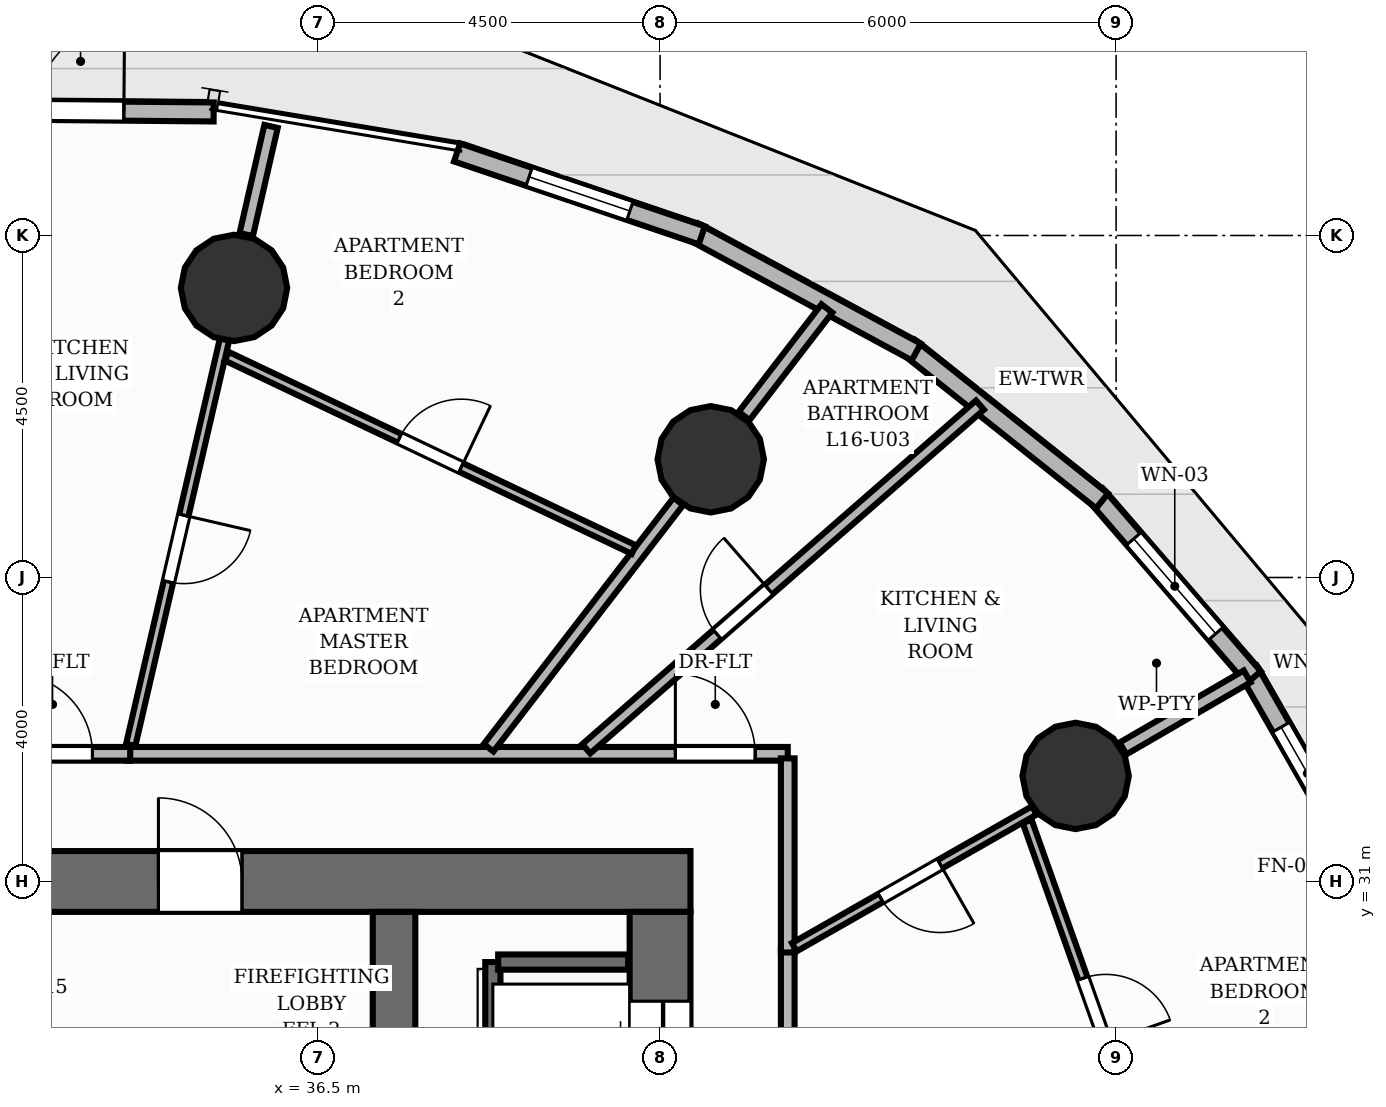
"""IFC4 building model, lengths in metres.
Left out: names, types, materials, properties, quantities, classifications, styles, units other than length and angle.
Written with IfcOpenShell. Run it as: python <this file> out.ifc"""

import sys

from ifc_helpers import new_model, si_unit, direction, frame, frame_2d, origin, origin_2d, place, context, subcontext, project, spatial, rectangle, circle, extrude, element, fill, save


model = new_model("IFC4")
c1 = context("Model", 3, precision=1e-05, world=origin(), true_north=direction((0.0, 1.0)))
c2 = subcontext(c1, "Body", "Model", "MODEL_VIEW")
j1 = project(units=[si_unit("LENGTHUNIT", "METRE"), si_unit("PLANEANGLEUNIT", "RADIAN")], contexts=[c1])
p1 = place(None, origin())
s1 = spatial("IfcSite", under=j1, at=p1, CompositionType="ELEMENT")
p2 = place(p1, origin())
s2 = spatial("IfcBuilding", under=s1, at=p2, CompositionType="ELEMENT")
p3 = place(p2, frame((0.0, 0.0, 56.8)))
s3 = spatial("IfcBuildingStorey", under=s2, at=p3, CompositionType="ELEMENT", Elevation=56.8)
p4 = place(p3, frame((22.6, 31.0, 0.0), z_axis=(0.0, 0.0, 1.0), x_axis=(1.0, 0.0, 0.0)))
e1 = element("IfcWall", 1, at=p4, inside=s3, PredefinedType="SHEAR", context=c2, shape_type="SweptSolid", body=[
    extrude(rectangle(XDim=18.8, YDim=0.8, at=frame_2d((9.4, 0.0))), origin(), (0.0, 0.0, 1.0), 3.2),
])
p5 = place(p4, frame((11.8, 0.0, 0.0)))
e2 = element("IfcOpeningElement", 2, at=p5, cuts=e1, PredefinedType="OPENING", context=c2, shape_type="SweptSolid", body=[
    extrude(rectangle(XDim=1.1, YDim=2.15, at=frame_2d((0.55, 1.075))), frame((0.0, 0.41, 0.0), z_axis=(0.0, -1.0, 0.0), x_axis=(1.0, 0.0, 0.0)), (0.0, 0.0, 1.0), 0.82),
])
p6 = place(p3, frame((41.0, 17.4, 0.0), z_axis=(0.0, 0.0, 1.0), x_axis=(0.0, 1.0, 0.0)))
e3 = element("IfcWall", 3, at=p6, inside=s3, PredefinedType="SHEAR", context=c2, shape_type="SweptSolid", body=[
    extrude(rectangle(XDim=13.2, YDim=0.8, at=frame_2d((6.6, 0.0))), origin(), (0.0, 0.0, 1.0), 3.2),
])
p7 = place(p6, frame((1.175, 0.0, 0.0)))
e4 = element("IfcOpeningElement", 4, at=p7, cuts=e3, PredefinedType="OPENING", context=c2, shape_type="SweptSolid", body=[
    extrude(rectangle(XDim=1.05, YDim=2.15, at=frame_2d((0.525, 1.075))), frame((0.0, 0.41, 0.0), z_axis=(0.0, -1.0, 0.0), x_axis=(1.0, 0.0, 0.0)), (0.0, 0.0, 1.0), 0.82),
])
p8 = place(p6, frame((4.425, 0.0, 0.0)))
e5 = element("IfcOpeningElement", 5, at=p8, cuts=e3, PredefinedType="OPENING", context=c2, shape_type="SweptSolid", body=[
    extrude(rectangle(XDim=1.05, YDim=2.15, at=frame_2d((0.525, 1.075))), frame((0.0, 0.41, 0.0), z_axis=(0.0, -1.0, 0.0), x_axis=(1.0, 0.0, 0.0)), (0.0, 0.0, 1.0), 0.82),
])
p9 = place(p6, frame((7.725, 0.0, 0.0)))
e6 = element("IfcOpeningElement", 6, at=p9, cuts=e3, PredefinedType="OPENING", context=c2, shape_type="SweptSolid", body=[
    extrude(rectangle(XDim=1.05, YDim=2.15, at=frame_2d((0.525, 1.075))), frame((0.0, 0.41, 0.0), z_axis=(0.0, -1.0, 0.0), x_axis=(1.0, 0.0, 0.0)), (0.0, 0.0, 1.0), 0.82),
])
p10 = place(p6, frame((10.975, 0.0, 0.0)))
e7 = element("IfcOpeningElement", 7, at=p10, cuts=e3, PredefinedType="OPENING", context=c2, shape_type="SweptSolid", body=[
    extrude(rectangle(XDim=1.05, YDim=2.15, at=frame_2d((0.525, 1.075))), frame((0.0, 0.41, 0.0), z_axis=(0.0, -1.0, 0.0), x_axis=(1.0, 0.0, 0.0)), (0.0, 0.0, 1.0), 0.82),
])
p11 = place(p3, frame((37.5, 17.4, 0.0), z_axis=(0.0, 0.0, 1.0), x_axis=(0.0, 1.0, 0.0)))
e8 = element("IfcWall", 8, at=p11, inside=s3, PredefinedType="SHEAR", context=c2, shape_type="SweptSolid", body=[
    extrude(rectangle(XDim=13.2, YDim=0.56, at=frame_2d((6.6, 0.0))), origin(), (0.0, 0.0, 1.0), 3.2),
])
for number, where, z_axis, x_axis in (
    (9, (46.468, 32.389, 0.0), (0.0, 0.0, 1.0), (1.0, 0.0, 0.0)),
    (10, (41.667, 36.555, 0.0), (0.0, 0.0, 1.0), (1.0, 0.0, 0.0)),
    (11, (35.395, 38.81, 0.0), (0.0, 0.0, 1.0), (1.0, 0.0, 0.0)),
):
    element("IfcColumn", number, at=place(p3, frame(where, z_axis=z_axis, x_axis=x_axis)), inside=s3, PredefinedType="COLUMN", context=c2, shape_type="SweptSolid", body=[
        extrude(circle(Radius=0.7, at=origin_2d()), origin(), (0.0, 0.0, 1.0), 3.2),
    ])
p12 = place(p3, frame((48.744, 33.777, 0.0), z_axis=(0.0, 0.0, 1.0), x_axis=(0.496155788519, -0.868233513243, 0.0)))
e12 = element("IfcWall", 12, at=p12, inside=s3, PredefinedType="SOLIDWALL", context=c2, shape_type="SweptSolid", body=[
    extrude(rectangle(XDim=3.121, YDim=0.25, at=frame_2d((1.56, 0.0))), origin(), (0.0, 0.0, 1.0), 2.96),
])
p13 = place(p12, frame((0.86, 0.0, 0.85)))
e13 = element("IfcOpeningElement", 13, at=p13, cuts=e12, PredefinedType="OPENING", context=c2, shape_type="SweptSolid", body=[
    extrude(rectangle(XDim=1.4, YDim=1.55, at=frame_2d((0.7, 0.775))), frame((0.0, 0.135, 0.0), z_axis=(0.0, -1.0, 0.0), x_axis=(1.0, 0.0, 0.0)), (0.0, 0.0, 1.0), 0.27),
])
p14 = place(p3, frame((46.734, 36.086, 0.0), z_axis=(0.0, 0.0, 1.0), x_axis=(0.653770062489, -0.75669327035, 0.0)))
e14 = element("IfcWall", 14, at=p14, inside=s3, PredefinedType="SOLIDWALL", context=c2, shape_type="SweptSolid", body=[
    extrude(rectangle(XDim=3.174, YDim=0.25, at=frame_2d((1.587, 0.0))), origin(), (0.0, 0.0, 1.0), 2.96),
])
p15 = place(p14, frame((0.762, 0.0, 0.85)))
e15 = element("IfcOpeningElement", 15, at=p15, cuts=e14, PredefinedType="OPENING", context=c2, shape_type="SweptSolid", body=[
    extrude(rectangle(XDim=1.65, YDim=1.55, at=frame_2d((0.825, 0.775))), frame((0.0, 0.135, 0.0), z_axis=(0.0, -1.0, 0.0), x_axis=(1.0, 0.0, 0.0)), (0.0, 0.0, 1.0), 0.27),
])
p16 = place(p3, frame((44.278, 38.029, 0.0), z_axis=(0.0, 0.0, 1.0), x_axis=(0.78232767864, -0.622867083119, 0.0)))
e16 = element("IfcWall", 16, at=p16, inside=s3, PredefinedType="SOLIDWALL", context=c2, shape_type="SweptSolid", body=[
    extrude(rectangle(XDim=3.244, YDim=0.25, at=frame_2d((1.622, 0.0))), origin(), (0.0, 0.0, 1.0), 2.96),
])
p17 = place(p3, frame((41.448, 39.546, 0.0), z_axis=(0.0, 0.0, 1.0), x_axis=(0.879811992908, -0.475321845843, 0.0)))
e17 = element("IfcWall", 17, at=p17, inside=s3, PredefinedType="SOLIDWALL", context=c2, shape_type="SweptSolid", body=[
    extrude(rectangle(XDim=3.323, YDim=0.25, at=frame_2d((1.661, 0.0))), origin(), (0.0, 0.0, 1.0), 2.96),
])
p18 = place(p3, frame((38.33, 40.593, 0.0), z_axis=(0.0, 0.0, 1.0), x_axis=(0.947149503871, -0.320792483262, 0.0)))
e18 = element("IfcWall", 18, at=p18, inside=s3, PredefinedType="SOLIDWALL", context=c2, shape_type="SweptSolid", body=[
    extrude(rectangle(XDim=3.399, YDim=0.25, at=frame_2d((1.699, 0.0))), origin(), (0.0, 0.0, 1.0), 2.96),
])
p19 = place(p18, frame((1.0, 0.0, 0.85)))
e19 = element("IfcOpeningElement", 19, at=p19, cuts=e18, PredefinedType="OPENING", context=c2, shape_type="SweptSolid", body=[
    extrude(rectangle(XDim=1.4, YDim=1.55, at=frame_2d((0.7, 0.775))), frame((0.0, 0.135, 0.0), z_axis=(0.0, -1.0, 0.0), x_axis=(1.0, 0.0, 0.0)), (0.0, 0.0, 1.0), 0.27),
])
p20 = place(p3, frame((31.614, 41.156, 0.0), z_axis=(0.0, 0.0, 1.0), x_axis=(0.999961046076, -0.008826456273, 0.0)))
e20 = element("IfcWall", 20, at=p20, inside=s3, PredefinedType="SOLIDWALL", context=c2, shape_type="SweptSolid", body=[
    extrude(rectangle(XDim=3.513, YDim=0.25, at=frame_2d((1.756, 0.0))), origin(), (0.0, 0.0, 1.0), 2.96),
])
p21 = place(p20, frame((1.181, 0.0, 0.0)))
e21 = element("IfcOpeningElement", 21, at=p21, cuts=e20, PredefinedType="OPENING", context=c2, shape_type="SweptSolid", body=[
    extrude(rectangle(XDim=1.15, YDim=2.2, at=frame_2d((0.575, 1.1))), frame((0.0, 0.135, 0.0), z_axis=(0.0, -1.0, 0.0), x_axis=(1.0, 0.0, 0.0)), (0.0, 0.0, 1.0), 0.27),
])
p22 = place(p3, frame((38.8, 18.06, 0.0), z_axis=(0.0, 0.0, 1.0), x_axis=(0.0, 1.0, 0.0)))
e22 = element("IfcWall", 22, at=p22, inside=s3, PredefinedType="SHEAR", context=c2, shape_type="SweptSolid", body=[
    extrude(rectangle(XDim=11.88, YDim=0.2, at=frame_2d((5.94, 0.0))), origin(), (0.0, 0.0, 1.0), 3.2),
])
p23 = place(p3, frame((38.87, 29.94, 0.0), z_axis=(0.0, 0.0, 1.0), x_axis=(1.0, 0.0, 0.0)))
e23 = element("IfcWall", 23, at=p23, inside=s3, PredefinedType="SHEAR", context=c2, shape_type="SweptSolid", body=[
    extrude(rectangle(XDim=1.71, YDim=0.2, at=frame_2d((0.855, 0.0))), origin(), (0.0, 0.0, 1.0), 3.2),
])
p24 = place(p3, frame((47.091, 32.75, 0.0), z_axis=(0.0, 0.0, 1.0), x_axis=(0.865027823723, 0.501723892379, 0.0)))
e24 = element("IfcWall", 24, at=p24, inside=s3, PredefinedType="PARTITIONING", context=c2, shape_type="SweptSolid", body=[
    extrude(rectangle(XDim=1.889, YDim=0.18, at=frame_2d((0.944, 0.0))), origin(), (0.0, 0.0, 1.0), 2.178),
])
p25 = place(p3, frame((42.106, 37.126, 0.0), z_axis=(0.0, 0.0, 1.0), x_axis=(0.61002145357, 0.792384897752, 0.0)))
e25 = element("IfcWall", 25, at=p25, inside=s3, PredefinedType="PARTITIONING", context=c2, shape_type="SweptSolid", body=[
    extrude(rectangle(XDim=1.785, YDim=0.18, at=frame_2d((0.892, 0.0))), origin(), (0.0, 0.0, 1.0), 2.178),
])
p26 = place(p3, frame((35.555, 39.512, 0.0), z_axis=(0.0, 0.0, 1.0), x_axis=(0.223491959946, 0.974705772959, 0.0)))
e26 = element("IfcWall", 26, at=p26, inside=s3, PredefinedType="PARTITIONING", context=c2, shape_type="SweptSolid", body=[
    extrude(rectangle(XDim=1.46, YDim=0.18, at=frame_2d((0.73, 0.0))), origin(), (0.0, 0.0, 1.0), 2.178),
])
p27 = place(p3, frame((42.68, 30.109, 0.0), z_axis=(0.0, 0.0, 1.0), x_axis=(0.0, -1.0, 0.0)))
e27 = element("IfcWall", 27, at=p27, inside=s3, PredefinedType="PARTITIONING", context=c2, shape_type="SweptSolid", body=[
    extrude(rectangle(XDim=14.789, YDim=0.18, at=frame_2d((7.395, 0.0))), origin(), (0.0, 0.0, 1.0), 2.955),
])
p28 = place(p27, frame((9.4, 0.0, 0.0)))
e28 = element("IfcOpeningElement", 28, at=p28, cuts=e27, PredefinedType="OPENING", context=c2, shape_type="SweptSolid", body=[
    extrude(rectangle(XDim=1.05, YDim=2.15, at=frame_2d((0.525, 1.075))), frame((0.0, 0.1, 0.0), z_axis=(0.0, -1.0, 0.0), x_axis=(1.0, 0.0, 0.0)), (0.0, 0.0, 1.0), 0.2),
])
p29 = place(p3, frame((33.988, 32.68, 0.0), z_axis=(0.0, 0.0, 1.0), x_axis=(1.0, 0.0, 0.0)))
e29 = element("IfcWall", 29, at=p29, inside=s3, PredefinedType="PARTITIONING", context=c2, shape_type="SweptSolid", body=[
    extrude(rectangle(XDim=8.692, YDim=0.18, at=frame_2d((4.346, 0.0))), origin(), (0.0, 0.0, 1.0), 2.955),
])
p30 = place(p29, frame((7.213, 0.0, 0.0)))
e30 = element("IfcOpeningElement", 30, at=p30, cuts=e29, PredefinedType="OPENING", context=c2, shape_type="SweptSolid", body=[
    extrude(rectangle(XDim=1.05, YDim=2.15, at=frame_2d((0.525, 1.075))), frame((0.0, 0.1, 0.0), z_axis=(0.0, -1.0, 0.0), x_axis=(1.0, 0.0, 0.0)), (0.0, 0.0, 1.0), 0.2),
])
p31 = place(p3, frame((42.68, 32.62, 0.0), z_axis=(0.0, 0.0, 1.0), x_axis=(0.0, -1.0, 0.0)))
e31 = element("IfcWall", 31, at=p31, inside=s3, PredefinedType="PARTITIONING", context=c2, shape_type="SweptSolid", body=[
    extrude(rectangle(XDim=2.554, YDim=0.18, at=frame_2d((1.277, 0.0))), origin(), (0.0, 0.0, 1.0), 2.955),
])
p32 = place(p3, frame((22.26, 32.68, 0.0), z_axis=(0.0, 0.0, 1.0), x_axis=(1.0, 0.0, 0.0)))
e32 = element("IfcWall", 32, at=p32, inside=s3, PredefinedType="PARTITIONING", context=c2, shape_type="SweptSolid", body=[
    extrude(rectangle(XDim=11.769, YDim=0.18, at=frame_2d((5.885, 0.0))), origin(), (0.0, 0.0, 1.0), 2.955),
])
p33 = place(p32, frame((10.222, 0.0, 0.0)))
e33 = element("IfcOpeningElement", 33, at=p33, cuts=e32, PredefinedType="OPENING", context=c2, shape_type="SweptSolid", body=[
    extrude(rectangle(XDim=1.05, YDim=2.15, at=frame_2d((0.525, 1.075))), frame((0.0, 0.1, 0.0), z_axis=(0.0, -1.0, 0.0), x_axis=(1.0, 0.0, 0.0)), (0.0, 0.0, 1.0), 0.2),
])
p34 = place(p3, frame((40.028, 32.746, 0.0), z_axis=(0.0, 0.0, 1.0), x_axis=(0.753328390337, 0.657644536442, 0.0)))
e34 = element("IfcWall", 34, at=p34, inside=s3, PredefinedType="PLUMBINGWALL", context=c2, shape_type="SweptSolid", body=[
    extrude(rectangle(XDim=6.876, YDim=0.16, at=frame_2d((3.438, 0.0))), origin(), (0.0, 0.0, 1.0), 2.955),
])
p35 = place(p34, frame((2.288, 0.0, 0.0)))
e35 = element("IfcOpeningElement", 35, at=p35, cuts=e34, PredefinedType="OPENING", context=c2, shape_type="SweptSolid", body=[
    extrude(rectangle(XDim=0.9, YDim=2.1, at=frame_2d((0.45, 1.05))), frame((0.0, 0.09, 0.0), z_axis=(0.0, -1.0, 0.0), x_axis=(1.0, 0.0, 0.0)), (0.0, 0.0, 1.0), 0.18),
])
p36 = place(p3, frame((45.925, 31.936, 0.0), z_axis=(0.0, 0.0, 1.0), x_axis=(-0.868837650683, -0.49509709831, 0.0)))
e36 = element("IfcWall", 36, at=p36, inside=s3, PredefinedType="PARTITIONING", context=c2, shape_type="SweptSolid", body=[
    extrude(rectangle(XDim=3.635, YDim=0.125, at=frame_2d((1.818, 0.0))), origin(), (0.0, 0.0, 1.0), 2.178),
])
p37 = place(p36, frame((1.428, 0.0, 0.0)))
e37 = element("IfcOpeningElement", 37, at=p37, cuts=e36, PredefinedType="OPENING", context=c2, shape_type="SweptSolid", body=[
    extrude(rectangle(XDim=0.9, YDim=2.1, at=frame_2d((0.45, 1.05))), frame((0.0, 0.073, 0.0), z_axis=(0.0, -1.0, 0.0), x_axis=(1.0, 0.0, 0.0)), (0.0, 0.0, 1.0), 0.145),
])
p38 = place(p3, frame((38.744, 32.759, 0.0), z_axis=(0.0, 0.0, 1.0), x_axis=(0.610079741913, 0.792340020766, 0.0)))
e38 = element("IfcWall", 38, at=p38, inside=s3, PredefinedType="PLUMBINGWALL", context=c2, shape_type="SweptSolid", body=[
    extrude(rectangle(XDim=4.092, YDim=0.16, at=frame_2d((2.046, 0.0))), origin(), (0.0, 0.0, 1.0), 2.178),
])
p39 = place(p3, frame((45.83, 31.79, 0.0), z_axis=(0.0, 0.0, 1.0), x_axis=(0.334664074365, -0.94233749651, 0.0)))
e39 = element("IfcWall", 39, at=p39, inside=s3, PredefinedType="PARTITIONING", context=c2, shape_type="SweptSolid", body=[
    extrude(rectangle(XDim=5.282, YDim=0.125, at=frame_2d((2.641, 0.0))), origin(), (0.0, 0.0, 1.0), 2.955),
])
p40 = place(p39, frame((2.191, 0.0, 0.0)))
e40 = element("IfcOpeningElement", 40, at=p40, cuts=e39, PredefinedType="OPENING", context=c2, shape_type="SweptSolid", body=[
    extrude(rectangle(XDim=0.9, YDim=2.1, at=frame_2d((0.45, 1.05))), frame((0.0, 0.073, 0.0), z_axis=(0.0, -1.0, 0.0), x_axis=(1.0, 0.0, 0.0)), (0.0, 0.0, 1.0), 0.145),
])
p41 = place(p3, frame((35.27, 38.132, 0.0), z_axis=(0.0, 0.0, 1.0), x_axis=(-0.225429323741, -0.974259523945, 0.0)))
e41 = element("IfcWall", 41, at=p41, inside=s3, PredefinedType="PARTITIONING", context=c2, shape_type="SweptSolid", body=[
    extrude(rectangle(XDim=5.476, YDim=0.125, at=frame_2d((2.738, 0.0))), origin(), (0.0, 0.0, 1.0), 2.178),
])
p42 = place(p41, frame((2.373, 0.0, 0.0)))
e42 = element("IfcOpeningElement", 42, at=p42, cuts=e41, PredefinedType="OPENING", context=c2, shape_type="SweptSolid", body=[
    extrude(rectangle(XDim=0.9, YDim=2.1, at=frame_2d((0.45, 1.05))), frame((0.0, 0.073, 0.0), z_axis=(0.0, -1.0, 0.0), x_axis=(1.0, 0.0, 0.0)), (0.0, 0.0, 1.0), 0.145),
])
p43 = place(p3, frame((35.299, 37.911, 0.0), z_axis=(0.0, 0.0, 1.0), x_axis=(0.903280297513, -0.429050934185, 0.0)))
e43 = element("IfcWall", 43, at=p43, inside=s3, PredefinedType="PARTITIONING", context=c2, shape_type="SweptSolid", body=[
    extrude(rectangle(XDim=5.928, YDim=0.125, at=frame_2d((2.964, 0.0))), origin(), (0.0, 0.0, 1.0), 2.955),
])
p44 = place(p43, frame((2.514, 0.0, 0.0)))
e44 = element("IfcOpeningElement", 44, at=p44, cuts=e43, PredefinedType="OPENING", context=c2, shape_type="SweptSolid", body=[
    extrude(rectangle(XDim=0.9, YDim=2.1, at=frame_2d((0.45, 1.05))), frame((0.0, 0.073, 0.0), z_axis=(0.0, -1.0, 0.0), x_axis=(1.0, 0.0, 0.0)), (0.0, 0.0, 1.0), 0.145),
])
p45 = place(p21, origin())
e45 = element("IfcDoor", 45, at=p45, inside=s3, OperationType="SINGLE_SWING_RIGHT", PredefinedType="DOOR", context=c2, shape_type="SweptSolid", body=[
    extrude(rectangle(XDim=1.15, YDim=2.2, at=frame_2d((0.575, 1.1))), frame((0.0, 0.025, 0.0), z_axis=(0.0, -1.0, 0.0), x_axis=(1.0, 0.0, 0.0)), (0.0, 0.0, 1.0), 0.05),
])
fill(e21, e45)
p46 = place(p13, origin())
e46 = element("IfcWindow", 46, at=p46, inside=s3, PartitioningType="SINGLE_PANEL", PredefinedType="WINDOW", context=c2, shape_type="SweptSolid", body=[
    extrude(rectangle(XDim=1.4, YDim=1.55, at=frame_2d((0.7, 0.775))), frame((0.0, 0.03, 0.0), z_axis=(0.0, -1.0, 0.0), x_axis=(1.0, 0.0, 0.0)), (0.0, 0.0, 1.0), 0.06),
])
fill(e13, e46)
p47 = place(p15, origin())
e47 = element("IfcWindow", 47, at=p47, inside=s3, PartitioningType="SINGLE_PANEL", PredefinedType="WINDOW", context=c2, shape_type="SweptSolid", body=[
    extrude(rectangle(XDim=1.65, YDim=1.55, at=frame_2d((0.825, 0.775))), frame((0.0, 0.03, 0.0), z_axis=(0.0, -1.0, 0.0), x_axis=(1.0, 0.0, 0.0)), (0.0, 0.0, 1.0), 0.06),
])
fill(e15, e47)
p48 = place(p19, origin())
e48 = element("IfcWindow", 48, at=p48, inside=s3, PartitioningType="SINGLE_PANEL", PredefinedType="WINDOW", context=c2, shape_type="SweptSolid", body=[
    extrude(rectangle(XDim=1.4, YDim=1.55, at=frame_2d((0.7, 0.775))), frame((0.0, 0.03, 0.0), z_axis=(0.0, -1.0, 0.0), x_axis=(1.0, 0.0, 0.0)), (0.0, 0.0, 1.0), 0.06),
])
fill(e19, e48)
p49 = place(p5, origin())
e49 = element("IfcDoor", 49, at=p49, inside=s3, OperationType="SINGLE_SWING_LEFT", PredefinedType="DOOR", context=c2, shape_type="SweptSolid", body=[
    extrude(rectangle(XDim=1.1, YDim=2.15, at=frame_2d((0.55, 1.075))), frame((0.0, 0.025, 0.0), z_axis=(0.0, -1.0, 0.0), x_axis=(1.0, 0.0, 0.0)), (0.0, 0.0, 1.0), 0.05),
])
fill(e2, e49)
p50 = place(p10, origin())
e50 = element("IfcDoor", 50, at=p50, inside=s3, OperationType="DOUBLE_DOOR_SLIDING", PredefinedType="DOOR", context=c2, shape_type="SweptSolid", body=[
    extrude(rectangle(XDim=1.05, YDim=2.15, at=frame_2d((0.525, 1.075))), frame((0.0, 0.025, 0.0), z_axis=(0.0, -1.0, 0.0), x_axis=(1.0, 0.0, 0.0)), (0.0, 0.0, 1.0), 0.05),
])
fill(e7, e50)
p51 = place(p30, origin())
e51 = element("IfcDoor", 51, at=p51, inside=s3, OperationType="SINGLE_SWING_LEFT", PredefinedType="DOOR", context=c2, shape_type="SweptSolid", body=[
    extrude(rectangle(XDim=1.05, YDim=2.15, at=frame_2d((0.525, 1.075))), frame((0.0, 0.025, 0.0), z_axis=(0.0, -1.0, 0.0), x_axis=(1.0, 0.0, 0.0)), (0.0, 0.0, 1.0), 0.05),
])
fill(e30, e51)
p52 = place(p35, origin())
e52 = element("IfcDoor", 52, at=p52, inside=s3, OperationType="SINGLE_SWING_RIGHT", PredefinedType="DOOR", context=c2, shape_type="SweptSolid", body=[
    extrude(rectangle(XDim=0.9, YDim=2.1, at=frame_2d((0.45, 1.05))), frame((0.0, 0.025, 0.0), z_axis=(0.0, -1.0, 0.0), x_axis=(1.0, 0.0, 0.0)), (0.0, 0.0, 1.0), 0.05),
])
fill(e35, e52)
p53 = place(p37, origin())
e53 = element("IfcDoor", 53, at=p53, inside=s3, OperationType="SINGLE_SWING_LEFT", PredefinedType="DOOR", context=c2, shape_type="SweptSolid", body=[
    extrude(rectangle(XDim=0.9, YDim=2.1, at=frame_2d((0.45, 1.05))), frame((0.0, 0.025, 0.0), z_axis=(0.0, -1.0, 0.0), x_axis=(1.0, 0.0, 0.0)), (0.0, 0.0, 1.0), 0.05),
])
fill(e37, e53)
p54 = place(p40, origin())
e54 = element("IfcDoor", 54, at=p54, inside=s3, OperationType="SINGLE_SWING_RIGHT", PredefinedType="DOOR", context=c2, shape_type="SweptSolid", body=[
    extrude(rectangle(XDim=0.9, YDim=2.1, at=frame_2d((0.45, 1.05))), frame((0.0, 0.025, 0.0), z_axis=(0.0, -1.0, 0.0), x_axis=(1.0, 0.0, 0.0)), (0.0, 0.0, 1.0), 0.05),
])
fill(e40, e54)
p55 = place(p33, origin())
e55 = element("IfcDoor", 55, at=p55, inside=s3, OperationType="SINGLE_SWING_LEFT", PredefinedType="DOOR", context=c2, shape_type="SweptSolid", body=[
    extrude(rectangle(XDim=1.05, YDim=2.15, at=frame_2d((0.525, 1.075))), frame((0.0, 0.025, 0.0), z_axis=(0.0, -1.0, 0.0), x_axis=(1.0, 0.0, 0.0)), (0.0, 0.0, 1.0), 0.05),
])
fill(e33, e55)
p56 = place(p42, origin())
e56 = element("IfcDoor", 56, at=p56, inside=s3, OperationType="SINGLE_SWING_LEFT", PredefinedType="DOOR", context=c2, shape_type="SweptSolid", body=[
    extrude(rectangle(XDim=0.9, YDim=2.1, at=frame_2d((0.45, 1.05))), frame((0.0, 0.025, 0.0), z_axis=(0.0, -1.0, 0.0), x_axis=(1.0, 0.0, 0.0)), (0.0, 0.0, 1.0), 0.05),
])
fill(e42, e56)
p57 = place(p44, origin())
e57 = element("IfcDoor", 57, at=p57, inside=s3, OperationType="SINGLE_SWING_RIGHT", PredefinedType="DOOR", context=c2, shape_type="SweptSolid", body=[
    extrude(rectangle(XDim=0.9, YDim=2.1, at=frame_2d((0.45, 1.05))), frame((0.0, 0.025, 0.0), z_axis=(0.0, -1.0, 0.0), x_axis=(1.0, 0.0, 0.0)), (0.0, 0.0, 1.0), 0.05),
])
fill(e44, e57)
save(model, sys.argv[1])
